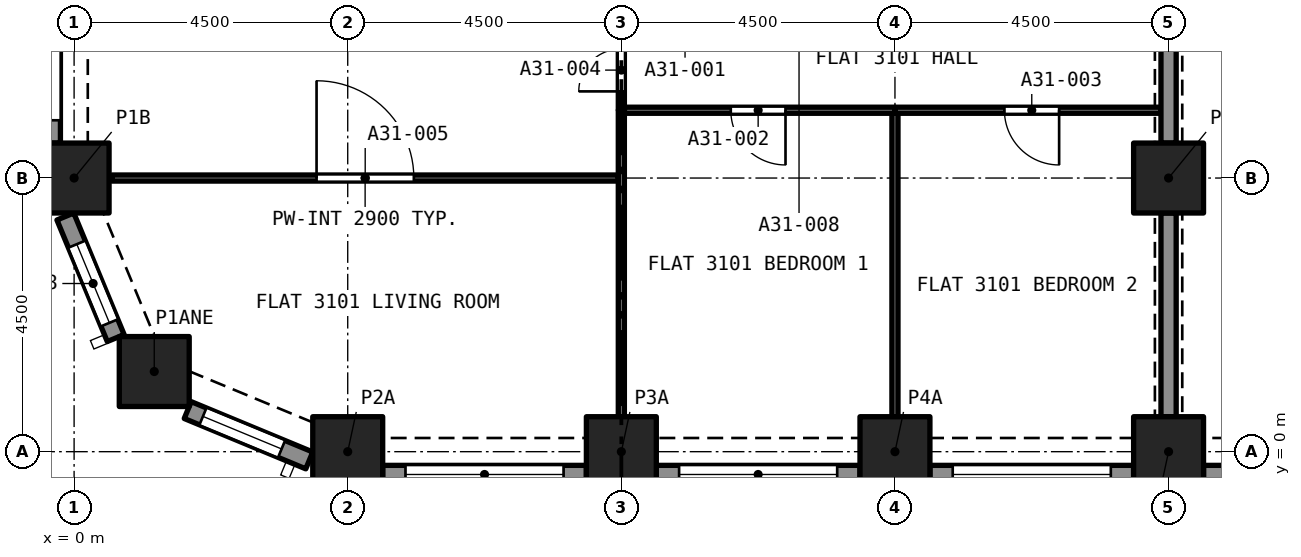
"""IFC4 building model, lengths in metres.
Left out: names, types, materials, properties, quantities, classifications, styles, units other than length and angle.
Written with IfcOpenShell. Run it as: python <this file> out.ifc"""

import sys

from ifc_helpers import new_model, si_unit, direction, frame, frame_2d, origin, origin_2d, place, context, subcontext, project, spatial, rectangle, extrude, element, fill, save


model = new_model("IFC4")
c1 = context("Model", 3, precision=1e-05, world=origin(), true_north=direction((0.0, 1.0)))
c2 = subcontext(c1, "Body", "Model", "MODEL_VIEW")
j1 = project(units=[si_unit("LENGTHUNIT", "METRE"), si_unit("PLANEANGLEUNIT", "RADIAN")], contexts=[c1])
p1 = place(None, origin())
s1 = spatial("IfcSite", under=j1, at=p1, CompositionType="ELEMENT")
p2 = place(p1, origin())
s2 = spatial("IfcBuilding", under=s1, at=p2, CompositionType="ELEMENT")
p3 = place(p2, frame((0.0, 0.0, 112.0)))
s3 = spatial("IfcBuildingStorey", under=s2, at=p3, CompositionType="ELEMENT", Elevation=112.0)
for number, where, z_axis, x_axis in (
    (1, (4.5, 0.0, 0.0), (0.0, 0.0, 1.0), (1.0, 0.0, 0.0)),
    (2, (9.0, 0.0, 0.0), (0.0, 0.0, 1.0), (1.0, 0.0, 0.0)),
    (3, (13.5, 0.0, 0.0), (0.0, 0.0, 1.0), (1.0, 0.0, 0.0)),
    (4, (18.0, 0.0, 0.0), (0.0, 0.0, 1.0), (1.0, 0.0, 0.0)),
    (5, (1.318, 1.318, 0.0), (0.0, 0.0, 1.0), (1.0, 0.0, 0.0)),
    (6, (0.0, 4.5, 0.0), (0.0, 0.0, 1.0), (1.0, 0.0, 0.0)),
    (7, (18.0, 4.5, 0.0), (0.0, 0.0, 1.0), (1.0, 0.0, 0.0)),
):
    element("IfcColumn", number, at=place(p3, frame(where, z_axis=z_axis, x_axis=x_axis)), inside=s3, PredefinedType="COLUMN", context=c2, shape_type="SweptSolid", body=[
        extrude(rectangle(XDim=1.15, YDim=1.15, at=origin_2d()), origin(), (0.0, 0.0, 1.0), 3.2),
    ])
p4 = place(p3, frame((0.684, 1.869, 0.0), z_axis=(0.0, 0.0, 1.0), x_axis=(-0.382723818695, 0.923862802911, 0.0)))
e8 = element("IfcWall", 8, at=p4, inside=s3, PredefinedType="SOLIDWALL", context=c2, shape_type="SweptSolid", body=[
    extrude(rectangle(XDim=2.164, YDim=0.3, at=frame_2d((1.082, 0.0))), origin(), (0.0, 0.0, 1.0), 3.2),
])
p5 = place(p4, frame((0.271, 0.0, 0.45)))
e9 = element("IfcOpeningElement", 9, at=p5, cuts=e8, PredefinedType="OPENING", context=c2, shape_type="SweptSolid", body=[
    extrude(rectangle(XDim=1.4, YDim=1.95, at=frame_2d((0.7, 0.975))), frame((0.0, 0.16, 0.0), z_axis=(0.0, -1.0, 0.0), x_axis=(1.0, 0.0, 0.0)), (0.0, 0.0, 1.0), 0.32),
])
p6 = place(p3, frame((3.868, -0.144, 0.0), z_axis=(0.0, 0.0, 1.0), x_axis=(-0.923862802911, 0.382723818695, 0.0)))
e10 = element("IfcWall", 10, at=p6, inside=s3, PredefinedType="SOLIDWALL", context=c2, shape_type="SweptSolid", body=[
    extrude(rectangle(XDim=2.164, YDim=0.3, at=frame_2d((1.082, 0.0))), origin(), (0.0, 0.0, 1.0), 3.2),
])
p7 = place(p6, frame((0.493, 0.0, 0.45)))
e11 = element("IfcOpeningElement", 11, at=p7, cuts=e10, PredefinedType="OPENING", context=c2, shape_type="SweptSolid", body=[
    extrude(rectangle(XDim=1.4, YDim=1.95, at=frame_2d((0.7, 0.975))), frame((0.0, 0.16, 0.0), z_axis=(0.0, -1.0, 0.0), x_axis=(1.0, 0.0, 0.0)), (0.0, 0.0, 1.0), 0.32),
])
p8 = place(p3, frame((8.425, -0.375, 0.0), z_axis=(0.0, 0.0, 1.0), x_axis=(-1.0, 0.0, 0.0)))
e12 = element("IfcWall", 12, at=p8, inside=s3, PredefinedType="SOLIDWALL", context=c2, shape_type="SweptSolid", body=[
    extrude(rectangle(XDim=3.35, YDim=0.3, at=frame_2d((1.675, 0.0))), origin(), (0.0, 0.0, 1.0), 3.2),
])
p9 = place(p8, frame((0.375, 0.0, 0.45)))
e13 = element("IfcOpeningElement", 13, at=p9, cuts=e12, PredefinedType="OPENING", context=c2, shape_type="SweptSolid", body=[
    extrude(rectangle(XDim=2.6, YDim=1.95, at=frame_2d((1.3, 0.975))), frame((0.0, 0.16, 0.0), z_axis=(0.0, -1.0, 0.0), x_axis=(1.0, 0.0, 0.0)), (0.0, 0.0, 1.0), 0.32),
])
p10 = place(p3, frame((12.925, -0.375, 0.0), z_axis=(0.0, 0.0, 1.0), x_axis=(-1.0, 0.0, 0.0)))
e14 = element("IfcWall", 14, at=p10, inside=s3, PredefinedType="SOLIDWALL", context=c2, shape_type="SweptSolid", body=[
    extrude(rectangle(XDim=3.35, YDim=0.3, at=frame_2d((1.675, 0.0))), origin(), (0.0, 0.0, 1.0), 3.2),
])
p11 = place(p10, frame((0.375, 0.0, 0.45)))
e15 = element("IfcOpeningElement", 15, at=p11, cuts=e14, PredefinedType="OPENING", context=c2, shape_type="SweptSolid", body=[
    extrude(rectangle(XDim=2.6, YDim=1.95, at=frame_2d((1.3, 0.975))), frame((0.0, 0.16, 0.0), z_axis=(0.0, -1.0, 0.0), x_axis=(1.0, 0.0, 0.0)), (0.0, 0.0, 1.0), 0.32),
])
p12 = place(p3, frame((17.425, -0.375, 0.0), z_axis=(0.0, 0.0, 1.0), x_axis=(-1.0, 0.0, 0.0)))
e16 = element("IfcWall", 16, at=p12, inside=s3, PredefinedType="SOLIDWALL", context=c2, shape_type="SweptSolid", body=[
    extrude(rectangle(XDim=3.35, YDim=0.3, at=frame_2d((1.675, 0.0))), origin(), (0.0, 0.0, 1.0), 3.2),
])
p13 = place(p12, frame((0.375, 0.0, 0.45)))
e17 = element("IfcOpeningElement", 17, at=p13, cuts=e16, PredefinedType="OPENING", context=c2, shape_type="SweptSolid", body=[
    extrude(rectangle(XDim=2.6, YDim=1.95, at=frame_2d((1.3, 0.975))), frame((0.0, 0.16, 0.0), z_axis=(0.0, -1.0, 0.0), x_axis=(1.0, 0.0, 0.0)), (0.0, 0.0, 1.0), 0.32),
])
p14 = place(p3, frame((21.925, -0.375, 0.0), z_axis=(0.0, 0.0, 1.0), x_axis=(-1.0, 0.0, 0.0)))
e18 = element("IfcWall", 18, at=p14, inside=s3, PredefinedType="SOLIDWALL", context=c2, shape_type="SweptSolid", body=[
    extrude(rectangle(XDim=3.35, YDim=0.3, at=frame_2d((1.675, 0.0))), origin(), (0.0, 0.0, 1.0), 3.2),
])
p15 = place(p14, frame((0.375, 0.0, 0.45)))
e19 = element("IfcOpeningElement", 19, at=p15, cuts=e18, PredefinedType="OPENING", context=c2, shape_type="SweptSolid", body=[
    extrude(rectangle(XDim=2.6, YDim=1.95, at=frame_2d((1.3, 0.975))), frame((0.0, 0.16, 0.0), z_axis=(0.0, -1.0, 0.0), x_axis=(1.0, 0.0, 0.0)), (0.0, 0.0, 1.0), 0.32),
])
p16 = place(p3, frame((-0.375, 5.075, 0.0), z_axis=(0.0, 0.0, 1.0), x_axis=(0.0, 1.0, 0.0)))
e20 = element("IfcWall", 20, at=p16, inside=s3, PredefinedType="SOLIDWALL", context=c2, shape_type="SweptSolid", body=[
    extrude(rectangle(XDim=3.35, YDim=0.3, at=frame_2d((1.675, 0.0))), origin(), (0.0, 0.0, 1.0), 3.2),
])
p17 = place(p16, frame((0.375, 0.0, 0.45)))
e21 = element("IfcOpeningElement", 21, at=p17, cuts=e20, PredefinedType="OPENING", context=c2, shape_type="SweptSolid", body=[
    extrude(rectangle(XDim=2.6, YDim=1.95, at=frame_2d((1.3, 0.975))), frame((0.0, 0.16, 0.0), z_axis=(0.0, -1.0, 0.0), x_axis=(1.0, 0.0, 0.0)), (0.0, 0.0, 1.0), 0.32),
])
p18 = place(p3, frame((13.5, 0.575, 0.0), z_axis=(0.0, 0.0, 1.0), x_axis=(0.0, 1.0, 0.0)))
e22 = element("IfcWall", 22, at=p18, inside=s3, PredefinedType="PARTITIONING", context=c2, shape_type="SweptSolid", body=[
    extrude(rectangle(XDim=4.99, YDim=0.1, at=frame_2d((2.495, 0.0))), origin(), (0.0, 0.0, 1.0), 2.9),
])
p19 = place(p3, frame((13.5, 5.615, 0.0), z_axis=(0.0, 0.0, 1.0), x_axis=(-1.0, 0.0, 0.0)))
e23 = element("IfcWall", 23, at=p19, inside=s3, PredefinedType="PARTITIONING", context=c2, shape_type="SweptSolid", body=[
    extrude(rectangle(XDim=4.45, YDim=0.1, at=frame_2d((2.225, 0.0))), origin(), (0.0, 0.0, 1.0), 2.9),
])
p20 = place(p19, frame((1.8, 0.0, 0.0)))
e24 = element("IfcOpeningElement", 24, at=p20, cuts=e23, PredefinedType="OPENING", context=c2, shape_type="SweptSolid", body=[
    extrude(rectangle(XDim=0.9, YDim=2.1, at=frame_2d((0.45, 1.05))), frame((0.0, 0.06, 0.0), z_axis=(0.0, -1.0, 0.0), x_axis=(1.0, 0.0, 0.0)), (0.0, 0.0, 1.0), 0.12),
])
p21 = place(p3, frame((9.0, 0.575, 0.0), z_axis=(0.0, 0.0, 1.0), x_axis=(0.0, 1.0, 0.0)))
e25 = element("IfcWall", 25, at=p21, inside=s3, PredefinedType="PARTITIONING", context=c2, shape_type="SweptSolid", body=[
    extrude(rectangle(XDim=5.04, YDim=0.1, at=frame_2d((2.52, 0.0))), origin(), (0.0, 0.0, 1.0), 2.9),
])
p22 = place(p3, frame((17.875, 5.615, 0.0), z_axis=(0.0, 0.0, 1.0), x_axis=(-1.0, 0.0, 0.0)))
e26 = element("IfcWall", 26, at=p22, inside=s3, PredefinedType="PARTITIONING", context=c2, shape_type="SweptSolid", body=[
    extrude(rectangle(XDim=4.375, YDim=0.1, at=frame_2d((2.188, 0.0))), origin(), (0.0, 0.0, 1.0), 2.9),
])
p23 = place(p22, frame((1.675, 0.0, 0.0)))
e27 = element("IfcOpeningElement", 27, at=p23, cuts=e26, PredefinedType="OPENING", context=c2, shape_type="SweptSolid", body=[
    extrude(rectangle(XDim=0.9, YDim=2.1, at=frame_2d((0.45, 1.05))), frame((0.0, 0.06, 0.0), z_axis=(0.0, -1.0, 0.0), x_axis=(1.0, 0.0, 0.0)), (0.0, 0.0, 1.0), 0.12),
])
for number, where, z_axis, x_axis in (
    (28, (18.0, 5.075, 0.0), (0.0, 0.0, 1.0), (0.0, 1.0, 0.0)),
    (29, (18.0, 0.575, 0.0), (0.0, 0.0, 1.0), (0.0, 1.0, 0.0)),
):
    element("IfcWall", number, at=place(p3, frame(where, z_axis=z_axis, x_axis=x_axis)), inside=s3, PredefinedType="PARTITIONING", context=c2, shape_type="SweptSolid", body=[
        extrude(rectangle(XDim=3.35, YDim=0.25, at=frame_2d((1.675, 0.0))), origin(), (0.0, 0.0, 1.0), 2.38),
    ])
p24 = place(p3, frame((9.0, 5.615, 0.0), z_axis=(0.0, 0.0, 1.0), x_axis=(0.0, 1.0, 0.0)))
e30 = element("IfcWall", 30, at=p24, inside=s3, PredefinedType="PARTITIONING", context=c2, shape_type="SweptSolid", body=[
    extrude(rectangle(XDim=1.34, YDim=0.1, at=frame_2d((0.67, 0.0))), origin(), (0.0, 0.0, 1.0), 2.9),
])
p25 = place(p24, frame((0.31, 0.0, 0.0)))
e31 = element("IfcOpeningElement", 31, at=p25, cuts=e30, PredefinedType="OPENING", context=c2, shape_type="SweptSolid", body=[
    extrude(rectangle(XDim=0.7, YDim=2.1, at=frame_2d((0.35, 1.05))), frame((0.0, 0.06, 0.0), z_axis=(0.0, -1.0, 0.0), x_axis=(1.0, 0.0, 0.0)), (0.0, 0.0, 1.0), 0.12),
])
p26 = place(p3, frame((0.622, 4.5, 0.0), z_axis=(0.0, 0.0, 1.0), x_axis=(1.0, 0.0, 0.0)))
e32 = element("IfcWall", 32, at=p26, inside=s3, PredefinedType="PARTITIONING", context=c2, shape_type="SweptSolid", body=[
    extrude(rectangle(XDim=8.328, YDim=0.1, at=frame_2d((4.164, 0.0))), origin(), (0.0, 0.0, 1.0), 2.9),
])
p27 = place(p26, frame((3.365, 0.0, 0.0)))
e33 = element("IfcOpeningElement", 33, at=p27, cuts=e32, PredefinedType="OPENING", context=c2, shape_type="SweptSolid", body=[
    extrude(rectangle(XDim=1.6, YDim=2.1, at=frame_2d((0.8, 1.05))), frame((0.0, 0.06, 0.0), z_axis=(0.0, -1.0, 0.0), x_axis=(1.0, 0.0, 0.0)), (0.0, 0.0, 1.0), 0.12),
])
p28 = place(p5, origin())
e34 = element("IfcWindow", 34, at=p28, inside=s3, PartitioningType="SINGLE_PANEL", PredefinedType="WINDOW", context=c2, shape_type="SweptSolid", body=[
    extrude(rectangle(XDim=1.4, YDim=1.95, at=frame_2d((0.7, 0.975))), frame((0.0, 0.03, 0.0), z_axis=(0.0, -1.0, 0.0), x_axis=(1.0, 0.0, 0.0)), (0.0, 0.0, 1.0), 0.06),
])
fill(e9, e34)
p29 = place(p7, origin())
e35 = element("IfcWindow", 35, at=p29, inside=s3, PartitioningType="SINGLE_PANEL", PredefinedType="WINDOW", context=c2, shape_type="SweptSolid", body=[
    extrude(rectangle(XDim=1.4, YDim=1.95, at=frame_2d((0.7, 0.975))), frame((0.0, 0.03, 0.0), z_axis=(0.0, -1.0, 0.0), x_axis=(1.0, 0.0, 0.0)), (0.0, 0.0, 1.0), 0.06),
])
fill(e11, e35)
p30 = place(p9, origin())
e36 = element("IfcWindow", 36, at=p30, inside=s3, PartitioningType="SINGLE_PANEL", PredefinedType="WINDOW", context=c2, shape_type="SweptSolid", body=[
    extrude(rectangle(XDim=2.6, YDim=1.95, at=frame_2d((1.3, 0.975))), frame((0.0, 0.03, 0.0), z_axis=(0.0, -1.0, 0.0), x_axis=(1.0, 0.0, 0.0)), (0.0, 0.0, 1.0), 0.06),
])
fill(e13, e36)
p31 = place(p11, origin())
e37 = element("IfcWindow", 37, at=p31, inside=s3, PartitioningType="SINGLE_PANEL", PredefinedType="WINDOW", context=c2, shape_type="SweptSolid", body=[
    extrude(rectangle(XDim=2.6, YDim=1.95, at=frame_2d((1.3, 0.975))), frame((0.0, 0.03, 0.0), z_axis=(0.0, -1.0, 0.0), x_axis=(1.0, 0.0, 0.0)), (0.0, 0.0, 1.0), 0.06),
])
fill(e15, e37)
p32 = place(p13, origin())
e38 = element("IfcWindow", 38, at=p32, inside=s3, PartitioningType="SINGLE_PANEL", PredefinedType="WINDOW", context=c2, shape_type="SweptSolid", body=[
    extrude(rectangle(XDim=2.6, YDim=1.95, at=frame_2d((1.3, 0.975))), frame((0.0, 0.03, 0.0), z_axis=(0.0, -1.0, 0.0), x_axis=(1.0, 0.0, 0.0)), (0.0, 0.0, 1.0), 0.06),
])
fill(e17, e38)
p33 = place(p17, origin())
e39 = element("IfcWindow", 39, at=p33, inside=s3, PartitioningType="SINGLE_PANEL", PredefinedType="WINDOW", context=c2, shape_type="SweptSolid", body=[
    extrude(rectangle(XDim=2.6, YDim=1.95, at=frame_2d((1.3, 0.975))), frame((0.0, 0.03, 0.0), z_axis=(0.0, -1.0, 0.0), x_axis=(1.0, 0.0, 0.0)), (0.0, 0.0, 1.0), 0.06),
])
fill(e21, e39)
p34 = place(p20, origin())
e40 = element("IfcDoor", 40, at=p34, inside=s3, OperationType="SINGLE_SWING_RIGHT", PredefinedType="DOOR", context=c2, shape_type="SweptSolid", body=[
    extrude(rectangle(XDim=0.9, YDim=2.1, at=frame_2d((0.45, 1.05))), frame((0.0, 0.025, 0.0), z_axis=(0.0, -1.0, 0.0), x_axis=(1.0, 0.0, 0.0)), (0.0, 0.0, 1.0), 0.05),
])
fill(e24, e40)
p35 = place(p23, origin())
e41 = element("IfcDoor", 41, at=p35, inside=s3, OperationType="SINGLE_SWING_LEFT", PredefinedType="DOOR", context=c2, shape_type="SweptSolid", body=[
    extrude(rectangle(XDim=0.9, YDim=2.1, at=frame_2d((0.45, 1.05))), frame((0.0, 0.025, 0.0), z_axis=(0.0, -1.0, 0.0), x_axis=(1.0, 0.0, 0.0)), (0.0, 0.0, 1.0), 0.05),
])
fill(e27, e41)
p36 = place(p25, origin())
e42 = element("IfcDoor", 42, at=p36, inside=s3, OperationType="SINGLE_SWING_LEFT", PredefinedType="DOOR", context=c2, shape_type="SweptSolid", body=[
    extrude(rectangle(XDim=0.7, YDim=2.1, at=frame_2d((0.35, 1.05))), frame((0.0, 0.025, 0.0), z_axis=(0.0, -1.0, 0.0), x_axis=(1.0, 0.0, 0.0)), (0.0, 0.0, 1.0), 0.05),
])
fill(e31, e42)
p37 = place(p27, origin())
e43 = element("IfcDoor", 43, at=p37, inside=s3, OperationType="SINGLE_SWING_RIGHT", PredefinedType="DOOR", context=c2, shape_type="SweptSolid", body=[
    extrude(rectangle(XDim=1.6, YDim=2.1, at=frame_2d((0.8, 1.05))), frame((0.0, 0.025, 0.0), z_axis=(0.0, -1.0, 0.0), x_axis=(1.0, 0.0, 0.0)), (0.0, 0.0, 1.0), 0.05),
])
fill(e33, e43)
save(model, sys.argv[1])
